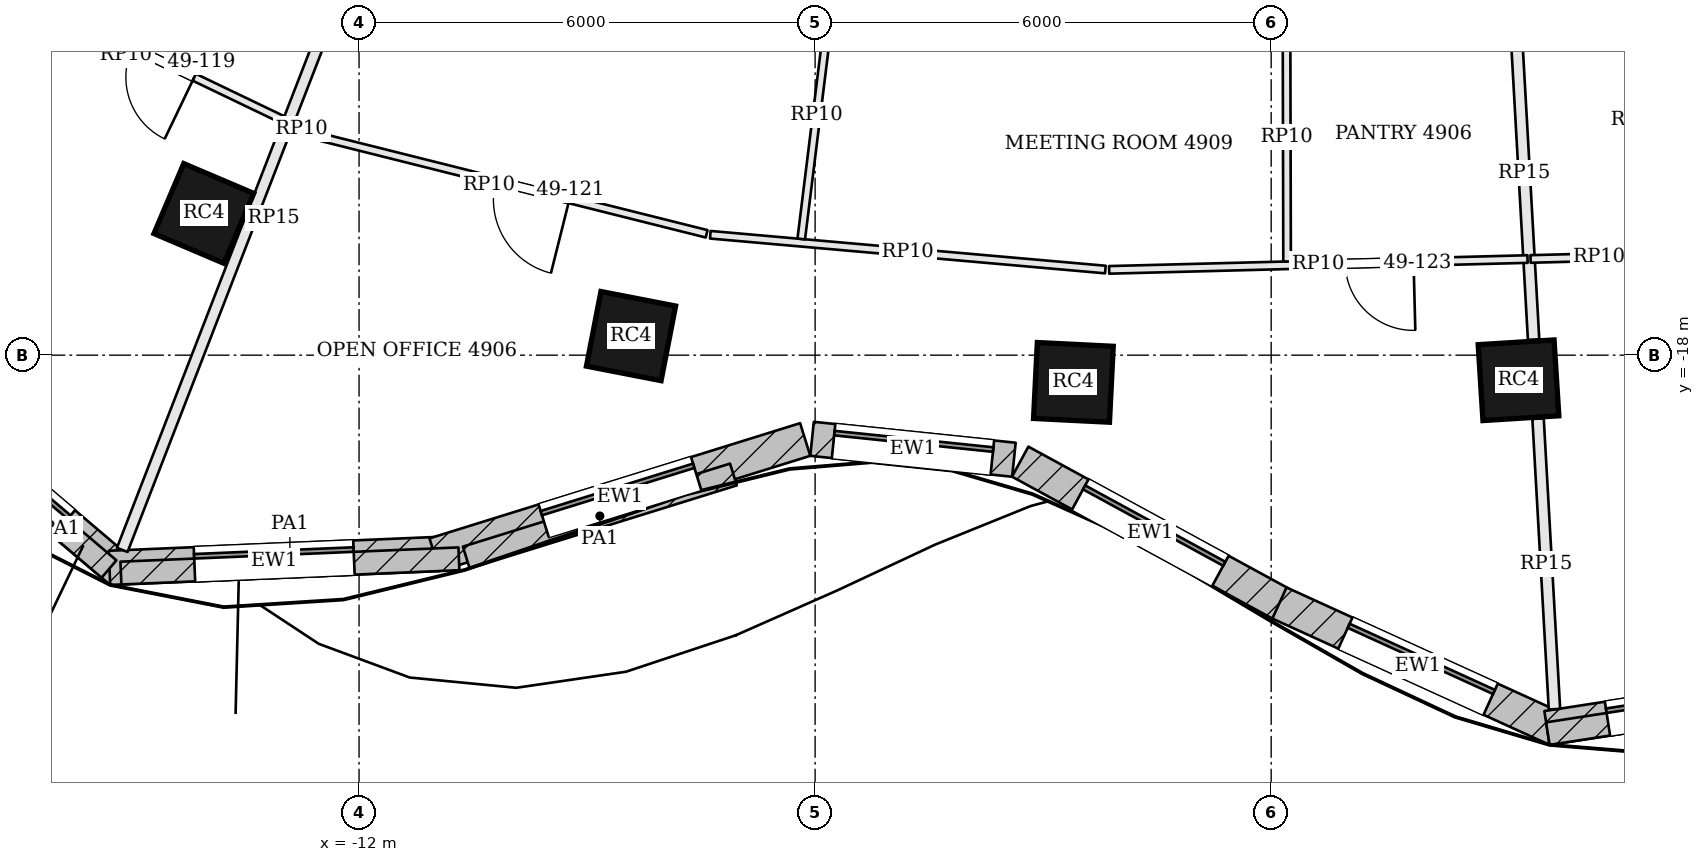
"""IFC4 building model, lengths in metres.
Left out: names, types, materials, properties, quantities, classifications, styles, units other than length and angle.
Written with IfcOpenShell. Run it as: python <this file> out.ifc"""

import sys

from ifc_helpers import new_model, si_unit, direction, frame, frame_2d, origin, origin_2d, place, context, subcontext, project, spatial, rectangle, extrude, element, fill, save


model = new_model("IFC4")
c1 = context("Model", 3, precision=1e-05, world=origin(), true_north=direction((0.0, 1.0)))
c2 = subcontext(c1, "Body", "Model", "MODEL_VIEW")
j1 = project(units=[si_unit("LENGTHUNIT", "METRE"), si_unit("PLANEANGLEUNIT", "RADIAN")], contexts=[c1])
p1 = place(None, origin())
s1 = spatial("IfcSite", under=j1, at=p1, CompositionType="ELEMENT")
p2 = place(p1, origin())
s2 = spatial("IfcBuilding", under=s1, at=p2, CompositionType="ELEMENT")
p3 = place(p2, frame((0.0, 0.0, 201.3)))
s3 = spatial("IfcBuildingStorey", under=s2, at=p3, CompositionType="ELEMENT", Elevation=201.3)
for number, where, z_axis, x_axis in (
    (1, (-14.042, -16.136, 0.0), (0.0, 0.0, 1.0), (0.92, -0.392, 0.0)),
    (2, (-8.422, -17.749, 0.0), (0.0, 0.0, 1.0), (0.982, -0.191, 0.0)),
    (3, (-2.602, -18.358, 0.0), (0.0, 0.0, 1.0), (0.999, -0.05, 0.0)),
    (4, (3.254, -18.33, 0.0), (0.0, 0.0, 1.0), (0.998, 0.063, 0.0)),
):
    element("IfcColumn", number, at=place(p3, frame(where, z_axis=z_axis, x_axis=x_axis)), inside=s3, PredefinedType="COLUMN", context=c2, shape_type="SweptSolid", body=[
        extrude(rectangle(XDim=1.0, YDim=1.0, at=origin_2d()), origin(), (0.0, 0.0, 1.0), 3.9),
    ])
p4 = place(p3, frame((-18.238, -18.212, 0.0), z_axis=(0.0, 0.0, 1.0), x_axis=(0.762479604733, -0.647012250554, 0.0)))
e5 = element("IfcWall", 5, at=p4, inside=s3, PredefinedType="SOLIDWALL", context=c2, shape_type="SweptSolid", body=[
    extrude(rectangle(XDim=4.079, YDim=0.45, at=frame_2d((2.039, 0.0))), origin(), (0.0, 0.0, 1.0), 3.7),
])
p5 = place(p4, frame((0.99, 0.0, 0.9)))
e6 = element("IfcOpeningElement", 6, at=p5, cuts=e5, PredefinedType="OPENING", context=c2, shape_type="SweptSolid", body=[
    extrude(rectangle(XDim=2.1, YDim=2.3, at=frame_2d((1.05, 1.15))), frame((0.0, 0.235, 0.0), z_axis=(0.0, -1.0, 0.0), x_axis=(1.0, 0.0, 0.0)), (0.0, 0.0, 1.0), 0.47),
])
p6 = place(p3, frame((-15.283, -20.798, 0.0), z_axis=(0.0, 0.0, 1.0), x_axis=(0.999108814386, 0.042208731526, 0.0)))
e7 = element("IfcWall", 7, at=p6, inside=s3, PredefinedType="SOLIDWALL", context=c2, shape_type="SweptSolid", body=[
    extrude(rectangle(XDim=4.338, YDim=0.45, at=frame_2d((2.169, 0.0))), origin(), (0.0, 0.0, 1.0), 3.7),
])
p7 = place(p6, frame((1.119, 0.0, 0.9)))
e8 = element("IfcOpeningElement", 8, at=p7, cuts=e7, PredefinedType="OPENING", context=c2, shape_type="SweptSolid", body=[
    extrude(rectangle(XDim=2.1, YDim=2.3, at=frame_2d((1.05, 1.15))), frame((0.0, 0.235, 0.0), z_axis=(0.0, -1.0, 0.0), x_axis=(1.0, 0.0, 0.0)), (0.0, 0.0, 1.0), 0.47),
])
p8 = place(p3, frame((-11.007, -20.625, 0.0), z_axis=(0.0, 0.0, 1.0), x_axis=(0.954949254112, 0.296769139352, 0.0)))
e9 = element("IfcWall", 9, at=p8, inside=s3, PredefinedType="SOLIDWALL", context=c2, shape_type="SweptSolid", body=[
    extrude(rectangle(XDim=5.106, YDim=0.45, at=frame_2d((2.553, 0.0))), origin(), (0.0, 0.0, 1.0), 3.7),
])
p9 = place(p8, frame((1.503, 0.0, 0.9)))
e10 = element("IfcOpeningElement", 10, at=p9, cuts=e9, PredefinedType="OPENING", context=c2, shape_type="SweptSolid", body=[
    extrude(rectangle(XDim=2.1, YDim=2.3, at=frame_2d((1.05, 1.15))), frame((0.0, 0.235, 0.0), z_axis=(0.0, -1.0, 0.0), x_axis=(1.0, 0.0, 0.0)), (0.0, 0.0, 1.0), 0.47),
])
p10 = place(p3, frame((-6.04, -19.101, 0.0), z_axis=(0.0, 0.0, 1.0), x_axis=(0.994675968472, -0.103052014752, 0.0)))
e11 = element("IfcWall", 11, at=p10, inside=s3, PredefinedType="SOLIDWALL", context=c2, shape_type="SweptSolid", body=[
    extrude(rectangle(XDim=2.67, YDim=0.45, at=frame_2d((1.335, 0.0))), origin(), (0.0, 0.0, 1.0), 3.7),
])
p11 = place(p10, frame((0.285, 0.0, 0.9)))
e12 = element("IfcOpeningElement", 12, at=p11, cuts=e11, PredefinedType="OPENING", context=c2, shape_type="SweptSolid", body=[
    extrude(rectangle(XDim=2.1, YDim=2.3, at=frame_2d((1.05, 1.15))), frame((0.0, 0.235, 0.0), z_axis=(0.0, -1.0, 0.0), x_axis=(1.0, 0.0, 0.0)), (0.0, 0.0, 1.0), 0.47),
])
p12 = place(p3, frame((-3.302, -19.401, 0.0), z_axis=(0.0, 0.0, 1.0), x_axis=(0.878060540763, -0.47854956562, 0.0)))
e13 = element("IfcWall", 13, at=p12, inside=s3, PredefinedType="SOLIDWALL", context=c2, shape_type="SweptSolid", body=[
    extrude(rectangle(XDim=3.901, YDim=0.45, at=frame_2d((1.951, 0.0))), origin(), (0.0, 0.0, 1.0), 3.7),
])
p13 = place(p12, frame((0.901, 0.0, 0.9)))
e14 = element("IfcOpeningElement", 14, at=p13, cuts=e13, PredefinedType="OPENING", context=c2, shape_type="SweptSolid", body=[
    extrude(rectangle(XDim=2.1, YDim=2.3, at=frame_2d((1.05, 1.15))), frame((0.0, 0.235, 0.0), z_axis=(0.0, -1.0, 0.0), x_axis=(1.0, 0.0, 0.0)), (0.0, 0.0, 1.0), 0.47),
])
p14 = place(p3, frame((0.109, -21.261, 0.0), z_axis=(0.0, 0.0, 1.0), x_axis=(0.910040573706, -0.414519184367, 0.0)))
e15 = element("IfcWall", 15, at=p14, inside=s3, PredefinedType="SOLIDWALL", context=c2, shape_type="SweptSolid", body=[
    extrude(rectangle(XDim=4.006, YDim=0.45, at=frame_2d((2.003, 0.0))), origin(), (0.0, 0.0, 1.0), 3.7),
])
p15 = place(p14, frame((0.953, 0.0, 0.9)))
e16 = element("IfcOpeningElement", 16, at=p15, cuts=e15, PredefinedType="OPENING", context=c2, shape_type="SweptSolid", body=[
    extrude(rectangle(XDim=2.1, YDim=2.3, at=frame_2d((1.05, 1.15))), frame((0.0, 0.235, 0.0), z_axis=(0.0, -1.0, 0.0), x_axis=(1.0, 0.0, 0.0)), (0.0, 0.0, 1.0), 0.47),
])
p16 = place(p3, frame((3.629, -22.905, 0.0), z_axis=(0.0, 0.0, 1.0), x_axis=(0.988300084321, 0.152521943772, 0.0)))
e17 = element("IfcWall", 17, at=p16, inside=s3, PredefinedType="SOLIDWALL", context=c2, shape_type="SweptSolid", body=[
    extrude(rectangle(XDim=3.71, YDim=0.45, at=frame_2d((1.855, 0.0))), origin(), (0.0, 0.0, 1.0), 3.7),
])
p17 = place(p16, frame((0.805, 0.0, 0.9)))
e18 = element("IfcOpeningElement", 18, at=p17, cuts=e17, PredefinedType="OPENING", context=c2, shape_type="SweptSolid", body=[
    extrude(rectangle(XDim=2.1, YDim=2.3, at=frame_2d((1.05, 1.15))), frame((0.0, 0.235, 0.0), z_axis=(0.0, -1.0, 0.0), x_axis=(1.0, 0.0, 0.0)), (0.0, 0.0, 1.0), 0.47),
])
p18 = place(p3, frame((-16.542, -19.75, 3.9), z_axis=(0.0, 0.0, 1.0), x_axis=(0.762426907318, -0.647074347349, 0.0)))
e19 = element("IfcWall", 19, at=p18, inside=s3, PredefinedType="PARAPET", context=c2, shape_type="SweptSolid", body=[
    extrude(rectangle(XDim=1.642, YDim=0.3, at=frame_2d((0.821, 0.0))), origin(), (0.0, 0.0, 1.0), 1.1),
])
p19 = place(p3, frame((-15.133, -20.867, 3.9), z_axis=(0.0, 0.0, 1.0), x_axis=(0.999109914186, 0.042182690458, 0.0)))
e20 = element("IfcWall", 20, at=p19, inside=s3, PredefinedType="PARAPET", context=c2, shape_type="SweptSolid", body=[
    extrude(rectangle(XDim=4.451, YDim=0.3, at=frame_2d((2.225, 0.0))), origin(), (0.0, 0.0, 1.0), 1.1),
])
p20 = place(p3, frame((-10.59, -20.662, 3.9), z_axis=(0.0, 0.0, 1.0), x_axis=(0.954933257017, 0.296820610207, 0.0)))
e21 = element("IfcWall", 21, at=p20, inside=s3, PredefinedType="PARAPET", context=c2, shape_type="SweptSolid", body=[
    extrude(rectangle(XDim=3.681, YDim=0.3, at=frame_2d((1.84, 0.0))), origin(), (0.0, 0.0, 1.0), 1.1),
])
p21 = place(p3, frame((3.64, -22.979, 3.9), z_axis=(0.0, 0.0, 1.0), x_axis=(0.988299486994, 0.152525814235, 0.0)))
e22 = element("IfcWall", 22, at=p21, inside=s3, PredefinedType="PARAPET", context=c2, shape_type="SweptSolid", body=[
    extrude(rectangle(XDim=3.602, YDim=0.3, at=frame_2d((1.801, 0.0))), origin(), (0.0, 0.0, 1.0), 1.1),
])
p22 = place(p3, frame((-15.115, -20.562, 0.0), z_axis=(0.0, 0.0, 1.0), x_axis=(0.361729399691, 0.932283133709, 0.0)))
e23 = element("IfcWall", 23, at=p22, inside=s3, PredefinedType="PARTITIONING", context=c2, shape_type="SweptSolid", body=[
    extrude(rectangle(XDim=9.369, YDim=0.15, at=frame_2d((4.685, 0.0))), origin(), (0.0, 0.0, 1.0), 3.084),
])
p23 = place(p3, frame((3.727, -22.657, 0.0), z_axis=(0.0, 0.0, 1.0), x_axis=(-0.056374181452, 0.998409711324, 0.0)))
e24 = element("IfcWall", 24, at=p23, inside=s3, PredefinedType="PARTITIONING", context=c2, shape_type="SweptSolid", body=[
    extrude(rectangle(XDim=3.828, YDim=0.15, at=frame_2d((1.914, 0.0))), origin(), (0.0, 0.0, 1.0), 3.084),
])
p24 = place(p3, frame((3.452, -17.796, 0.0), z_axis=(0.0, 0.0, 1.0), x_axis=(-0.056341757652, 0.998411541572, 0.0)))
e25 = element("IfcWall", 25, at=p24, inside=s3, PredefinedType="PARTITIONING", context=c2, shape_type="SweptSolid", body=[
    extrude(rectangle(XDim=4.39, YDim=0.15, at=frame_2d((2.195, 0.0))), origin(), (0.0, 0.0, 1.0), 3.084),
])
p25 = place(p3, frame((-12.951, -14.928, 0.0), z_axis=(0.0, 0.0, 1.0), x_axis=(-0.901512652017, 0.43275274494, 0.0)))
e26 = element("IfcWall", 26, at=p25, inside=s3, PredefinedType="PARTITIONING", context=c2, shape_type="SweptSolid", body=[
    extrude(rectangle(XDim=4.028, YDim=0.1, at=frame_2d((2.014, 0.0))), origin(), (0.0, 0.0, 1.0), 3.084),
])
p26 = place(p25, frame((1.35, 0.0, 0.0)))
e27 = element("IfcOpeningElement", 27, at=p26, cuts=e26, PredefinedType="OPENING", context=c2, shape_type="SweptSolid", body=[
    extrude(rectangle(XDim=0.9, YDim=2.1, at=frame_2d((0.45, 1.05))), frame((0.0, 0.06, 0.0), z_axis=(0.0, -1.0, 0.0), x_axis=(1.0, 0.0, 0.0)), (0.0, 0.0, 1.0), 0.12),
])
p27 = place(p3, frame((3.373, -16.736, 0.0), z_axis=(0.0, 0.0, 1.0), x_axis=(-0.99966581351, -0.025850750467, 0.0)))
e28 = element("IfcWall", 28, at=p27, inside=s3, PredefinedType="PARTITIONING", context=c2, shape_type="SweptSolid", body=[
    extrude(rectangle(XDim=5.506, YDim=0.1, at=frame_2d((2.753, 0.0))), origin(), (0.0, 0.0, 1.0), 3.084),
])
p28 = place(p27, frame((1.5, 0.0, 0.0)))
e29 = element("IfcOpeningElement", 29, at=p28, cuts=e28, PredefinedType="OPENING", context=c2, shape_type="SweptSolid", body=[
    extrude(rectangle(XDim=0.9, YDim=2.1, at=frame_2d((0.45, 1.05))), frame((0.0, 0.06, 0.0), z_axis=(0.0, -1.0, 0.0), x_axis=(1.0, 0.0, 0.0)), (0.0, 0.0, 1.0), 0.12),
])
p29 = place(p3, frame((-2.181, -16.874, 0.0), z_axis=(0.0, 0.0, 1.0), x_axis=(-0.996143934904, 0.087734035321, 0.0)))
e30 = element("IfcWall", 30, at=p29, inside=s3, PredefinedType="PARTITIONING", context=c2, shape_type="SweptSolid", body=[
    extrude(rectangle(XDim=5.218, YDim=0.1, at=frame_2d((2.609, 0.0))), origin(), (0.0, 0.0, 1.0), 3.084),
])
p30 = place(p3, frame((-7.427, -16.404, 0.0), z_axis=(0.0, 0.0, 1.0), x_axis=(-0.970009158253, 0.243068370845, 0.0)))
e31 = element("IfcWall", 31, at=p30, inside=s3, PredefinedType="PARTITIONING", context=c2, shape_type="SweptSolid", body=[
    extrude(rectangle(XDim=5.283, YDim=0.1, at=frame_2d((2.642, 0.0))), origin(), (0.0, 0.0, 1.0), 3.084),
])
p31 = place(p30, frame((1.861, 0.0, 0.0)))
e32 = element("IfcOpeningElement", 32, at=p31, cuts=e31, PredefinedType="OPENING", context=c2, shape_type="SweptSolid", body=[
    extrude(rectangle(XDim=1.0, YDim=2.1, at=frame_2d((0.5, 1.05))), frame((0.0, 0.06, 0.0), z_axis=(0.0, -1.0, 0.0), x_axis=(1.0, 0.0, 0.0)), (0.0, 0.0, 1.0), 0.12),
])
p32 = place(p3, frame((-12.597, -15.098, 0.0), z_axis=(0.0, 0.0, 1.0), x_axis=(-0.901523057468, 0.432731067585, 0.0)))
e33 = element("IfcWall", 33, at=p32, inside=s3, PredefinedType="PARTITIONING", context=c2, shape_type="SweptSolid", body=[
    extrude(rectangle(XDim=0.352, YDim=0.1, at=frame_2d((0.176, 0.0))), origin(), (0.0, 0.0, 1.0), 3.084),
])
p33 = place(p3, frame((-5.78, -13.219, 0.0), z_axis=(0.0, 0.0, 1.0), x_axis=(-0.122778425758, -0.992434107721, 0.0)))
e34 = element("IfcWall", 34, at=p33, inside=s3, PredefinedType="PARTITIONING", context=c2, shape_type="SweptSolid", body=[
    extrude(rectangle(XDim=3.277, YDim=0.1, at=frame_2d((1.639, 0.0))), origin(), (0.0, 0.0, 1.0), 3.084),
])
p34 = place(p3, frame((0.201, -13.491, 0.0), z_axis=(0.0, 0.0, 1.0), x_axis=(0.002384849381, -0.999997156243, 0.0)))
e35 = element("IfcWall", 35, at=p34, inside=s3, PredefinedType="PARTITIONING", context=c2, shape_type="SweptSolid", body=[
    extrude(rectangle(XDim=3.276, YDim=0.1, at=frame_2d((1.638, 0.0))), origin(), (0.0, 0.0, 1.0), 3.084),
])
p35 = place(p3, frame((5.214, -16.688, 0.0), z_axis=(0.0, 0.0, 1.0), x_axis=(-0.999661565486, -0.026014505364, 0.0)))
e36 = element("IfcWall", 36, at=p35, inside=s3, PredefinedType="PARTITIONING", context=c2, shape_type="SweptSolid", body=[
    extrude(rectangle(XDim=1.802, YDim=0.1, at=frame_2d((0.901, 0.0))), origin(), (0.0, 0.0, 1.0), 3.084),
])
p36 = place(p5, origin())
e37 = element("IfcWindow", 37, at=p36, inside=s3, PartitioningType="SINGLE_PANEL", PredefinedType="WINDOW", context=c2, shape_type="SweptSolid", body=[
    extrude(rectangle(XDim=2.1, YDim=2.3, at=frame_2d((1.05, 1.15))), frame((0.0, 0.135, 0.0), z_axis=(0.0, -1.0, 0.0), x_axis=(1.0, 0.0, 0.0)), (0.0, 0.0, 1.0), 0.06),
])
fill(e6, e37)
p37 = place(p7, origin())
e38 = element("IfcWindow", 38, at=p37, inside=s3, PartitioningType="SINGLE_PANEL", PredefinedType="WINDOW", context=c2, shape_type="SweptSolid", body=[
    extrude(rectangle(XDim=2.1, YDim=2.3, at=frame_2d((1.05, 1.15))), frame((0.0, 0.135, 0.0), z_axis=(0.0, -1.0, 0.0), x_axis=(1.0, 0.0, 0.0)), (0.0, 0.0, 1.0), 0.06),
])
fill(e8, e38)
p38 = place(p9, origin())
e39 = element("IfcWindow", 39, at=p38, inside=s3, PartitioningType="SINGLE_PANEL", PredefinedType="WINDOW", context=c2, shape_type="SweptSolid", body=[
    extrude(rectangle(XDim=2.1, YDim=2.3, at=frame_2d((1.05, 1.15))), frame((0.0, 0.135, 0.0), z_axis=(0.0, -1.0, 0.0), x_axis=(1.0, 0.0, 0.0)), (0.0, 0.0, 1.0), 0.06),
])
fill(e10, e39)
p39 = place(p11, origin())
e40 = element("IfcWindow", 40, at=p39, inside=s3, PartitioningType="SINGLE_PANEL", PredefinedType="WINDOW", context=c2, shape_type="SweptSolid", body=[
    extrude(rectangle(XDim=2.1, YDim=2.3, at=frame_2d((1.05, 1.15))), frame((0.0, 0.135, 0.0), z_axis=(0.0, -1.0, 0.0), x_axis=(1.0, 0.0, 0.0)), (0.0, 0.0, 1.0), 0.06),
])
fill(e12, e40)
p40 = place(p13, origin())
e41 = element("IfcWindow", 41, at=p40, inside=s3, PartitioningType="SINGLE_PANEL", PredefinedType="WINDOW", context=c2, shape_type="SweptSolid", body=[
    extrude(rectangle(XDim=2.1, YDim=2.3, at=frame_2d((1.05, 1.15))), frame((0.0, 0.135, 0.0), z_axis=(0.0, -1.0, 0.0), x_axis=(1.0, 0.0, 0.0)), (0.0, 0.0, 1.0), 0.06),
])
fill(e14, e41)
p41 = place(p15, origin())
e42 = element("IfcWindow", 42, at=p41, inside=s3, PartitioningType="SINGLE_PANEL", PredefinedType="WINDOW", context=c2, shape_type="SweptSolid", body=[
    extrude(rectangle(XDim=2.1, YDim=2.3, at=frame_2d((1.05, 1.15))), frame((0.0, 0.135, 0.0), z_axis=(0.0, -1.0, 0.0), x_axis=(1.0, 0.0, 0.0)), (0.0, 0.0, 1.0), 0.06),
])
fill(e16, e42)
p42 = place(p17, origin())
e43 = element("IfcWindow", 43, at=p42, inside=s3, PartitioningType="SINGLE_PANEL", PredefinedType="WINDOW", context=c2, shape_type="SweptSolid", body=[
    extrude(rectangle(XDim=2.1, YDim=2.3, at=frame_2d((1.05, 1.15))), frame((0.0, 0.135, 0.0), z_axis=(0.0, -1.0, 0.0), x_axis=(1.0, 0.0, 0.0)), (0.0, 0.0, 1.0), 0.06),
])
fill(e18, e43)
p43 = place(p26, origin())
e44 = element("IfcDoor", 44, at=p43, inside=s3, OperationType="SINGLE_SWING_LEFT", PredefinedType="DOOR", context=c2, shape_type="SweptSolid", body=[
    extrude(rectangle(XDim=0.9, YDim=2.1, at=frame_2d((0.45, 1.05))), frame((0.0, 0.025, 0.0), z_axis=(0.0, -1.0, 0.0), x_axis=(1.0, 0.0, 0.0)), (0.0, 0.0, 1.0), 0.05),
])
fill(e27, e44)
p44 = place(p31, origin())
e45 = element("IfcDoor", 45, at=p44, inside=s3, OperationType="SINGLE_SWING_LEFT", PredefinedType="DOOR", context=c2, shape_type="SweptSolid", body=[
    extrude(rectangle(XDim=1.0, YDim=2.1, at=frame_2d((0.5, 1.05))), frame((0.0, 0.025, 0.0), z_axis=(0.0, -1.0, 0.0), x_axis=(1.0, 0.0, 0.0)), (0.0, 0.0, 1.0), 0.05),
])
fill(e32, e45)
p45 = place(p28, origin())
e46 = element("IfcDoor", 46, at=p45, inside=s3, OperationType="SINGLE_SWING_LEFT", PredefinedType="DOOR", context=c2, shape_type="SweptSolid", body=[
    extrude(rectangle(XDim=0.9, YDim=2.1, at=frame_2d((0.45, 1.05))), frame((0.0, 0.025, 0.0), z_axis=(0.0, -1.0, 0.0), x_axis=(1.0, 0.0, 0.0)), (0.0, 0.0, 1.0), 0.05),
])
fill(e29, e46)
save(model, sys.argv[1])
